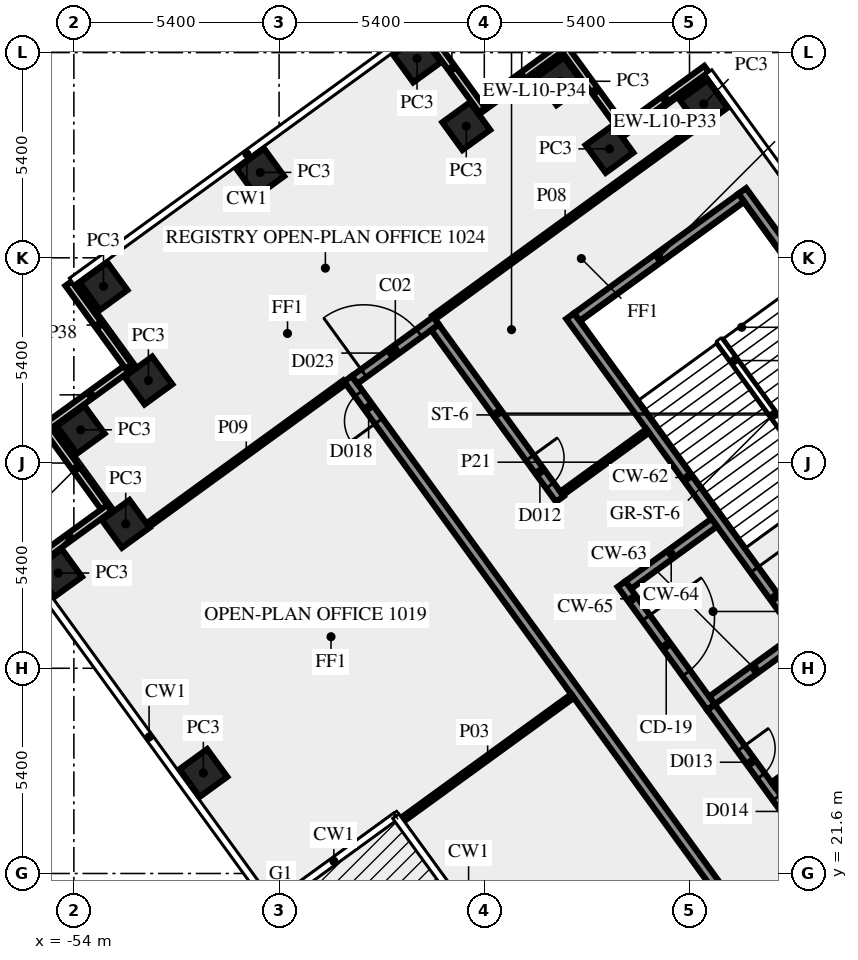
"""IFC4 building model, lengths in metres.
Left out: names, types, materials, properties, quantities, classifications, styles, units other than length and angle.
Written with IfcOpenShell. Run it as: python <this file> out.ifc"""

import sys

from ifc_helpers import new_model, si_unit, direction, frame, frame_2d, origin, origin_2d, place, context, subcontext, project, spatial, rectangle, extrude, element, fill, save


model = new_model("IFC4")
c1 = context("Model", 3, precision=1e-05, world=origin(), true_north=direction((0.0, 1.0)))
c2 = subcontext(c1, "Body", "Model", "MODEL_VIEW")
j1 = project(units=[si_unit("LENGTHUNIT", "METRE"), si_unit("PLANEANGLEUNIT", "RADIAN")], contexts=[c1])
p1 = place(None, origin())
s1 = spatial("IfcSite", under=j1, at=p1, CompositionType="ELEMENT")
p2 = place(p1, origin())
s2 = spatial("IfcBuilding", under=s1, at=p2, CompositionType="ELEMENT")
p3 = place(p2, frame((0.0, 0.0, 47.0)))
s3 = spatial("IfcBuildingStorey", under=s2, at=p3, CompositionType="ELEMENT", Elevation=47.0)
for number, where, z_axis, x_axis in (
    (1, (-37.425, 41.85, 0.0), (0.0, 0.0, 1.0), (-0.588, 0.809, 0.0)),
    (2, (-39.906, 40.666, 0.0), (0.0, 0.0, 1.0), (-0.588, 0.809, 0.0)),
    (3, (-41.2, 42.445, 0.0), (0.0, 0.0, 1.0), (-0.588, 0.809, 0.0)),
    (4, (-43.675, 41.265, 0.0), (0.0, 0.0, 1.0), (-0.809, -0.588, 0.0)),
    (5, (-44.97, 43.045, 0.0), (0.0, 0.0, 1.0), (-0.809, -0.588, 0.0)),
    (6, (-49.096, 40.047, 0.0), (0.0, 0.0, 1.0), (-0.809, -0.588, 0.0)),
    (7, (-53.22, 37.05, 0.0), (0.0, 0.0, 1.0), (0.588, -0.809, 0.0)),
    (8, (-52.039, 34.571, 0.0), (0.0, 0.0, 1.0), (-0.809, -0.588, 0.0)),
    (9, (-53.82, 33.275, 0.0), (0.0, 0.0, 1.0), (0.588, -0.809, 0.0)),
    (10, (-52.636, 30.8, 0.0), (0.0, 0.0, 1.0), (-0.809, -0.588, 0.0)),
    (11, (-54.415, 29.505, 0.0), (0.0, 0.0, 1.0), (0.588, -0.809, 0.0)),
    (12, (-50.592, 24.243, 0.0), (0.0, 0.0, 1.0), (0.588, -0.809, 0.0)),
):
    element("IfcColumn", number, at=place(p3, frame(where, z_axis=z_axis, x_axis=x_axis)), inside=s3, PredefinedType="COLUMN", context=c2, shape_type="SweptSolid", body=[
        extrude(rectangle(XDim=0.9, YDim=0.9, at=origin_2d()), origin(), (0.0, 0.0, 1.0), 3.65),
    ])
p4 = place(p3, frame((-52.465, 34.987, 0.0), z_axis=(0.0, 0.0, 1.0), x_axis=(-0.809033161865, -0.587762999008, 0.0)))
e13 = element("IfcWall", 13, at=p4, inside=s3, PredefinedType="SOLIDWALL", context=c2, shape_type="SweptSolid", body=[
    extrude(rectangle(XDim=2.7, YDim=0.2, at=frame_2d((1.35, 0.0))), origin(), (0.0, 0.0, 1.0), 3.65),
])
p5 = place(p3, frame((-54.738, 33.351, 0.0), z_axis=(0.0, 0.0, 1.0), x_axis=(0.587779184282, -0.809021403008, 0.0)))
e14 = element("IfcWall", 14, at=p5, inside=s3, PredefinedType="SOLIDWALL", context=c2, shape_type="SweptSolid", body=[
    extrude(rectangle(XDim=2.7, YDim=0.2, at=frame_2d((1.35, 0.0))), origin(), (0.0, 0.0, 1.0), 3.65),
])
p6 = place(p3, frame((-53.063, 31.216, 0.0), z_axis=(0.0, 0.0, 1.0), x_axis=(-0.80902431253, -0.587775179585, 0.0)))
e15 = element("IfcWall", 15, at=p6, inside=s3, PredefinedType="SOLIDWALL", context=c2, shape_type="SweptSolid", body=[
    extrude(rectangle(XDim=2.6, YDim=0.2, at=frame_2d((1.3, 0.0))), origin(), (0.0, 0.0, 1.0), 3.65),
])
p7 = place(p3, frame((-37.353, 42.768, 0.0), z_axis=(0.0, 0.0, 1.0), x_axis=(-0.809033161865, -0.587762999008, 0.0)))
e16 = element("IfcWall", 16, at=p7, inside=s3, PredefinedType="SOLIDWALL", context=c2, shape_type="SweptSolid", body=[
    extrude(rectangle(XDim=2.7, YDim=0.2, at=frame_2d((1.35, 0.0))), origin(), (0.0, 0.0, 1.0), 3.65),
])
p8 = place(p3, frame((-39.488, 41.094, 0.0), z_axis=(0.0, 0.0, 1.0), x_axis=(-0.587806000234, 0.809001919707, 0.0)))
e17 = element("IfcWall", 17, at=p8, inside=s3, PredefinedType="SOLIDWALL", context=c2, shape_type="SweptSolid", body=[
    extrude(rectangle(XDim=2.7, YDim=0.2, at=frame_2d((1.35, 0.0))), origin(), (0.0, 0.0, 1.0), 3.65),
])
for number, where, z_axis, x_axis in (
    (18, (-41.124, 43.366, 0.0), (0.0, 0.0, 1.0), (-0.809, -0.588, 0.0)),
    (19, (-43.259, 41.691, 0.0), (0.0, 0.0, 1.0), (-0.588, 0.809, 0.0)),
    (20, (-54.14, 37.123, 0.0), (0.0, 0.0, 1.0), (0.588, -0.809, 0.0)),
):
    element("IfcWall", number, at=place(p3, frame(where, z_axis=z_axis, x_axis=x_axis)), inside=s3, PredefinedType="SOLIDWALL", context=c2, shape_type="SweptSolid", body=[
        extrude(rectangle(XDim=2.7, YDim=0.2, at=frame_2d((1.35, 0.0))), origin(), (0.0, 0.0, 1.0), 3.65),
    ])
p9 = place(p3, frame((-30.24, 31.064, 0.0), z_axis=(0.0, 0.0, 1.0), x_axis=(-0.587795589702, 0.809009483706, 0.0)))
e21 = element("IfcWall", 21, at=p9, inside=s3, PredefinedType="SHEAR", context=c2, shape_type="SweptSolid", body=[
    extrude(rectangle(XDim=10.5, YDim=0.25, at=frame_2d((5.25, 0.0))), origin(), (0.0, 0.0, 1.0), 3.65),
])
p10 = place(p9, frame((2.15, 0.0, 1.0)))
e22 = element("IfcOpeningElement", 22, at=p10, cuts=e21, PredefinedType="OPENING", context=c2, shape_type="SweptSolid", body=[
    extrude(rectangle(XDim=1.2, YDim=1.2, at=frame_2d((0.6, 0.6))), frame((0.0, 0.135, 0.0), z_axis=(0.0, -1.0, 0.0), x_axis=(1.0, 0.0, 0.0)), (0.0, 0.0, 1.0), 0.27),
])
p11 = place(p3, frame((-36.439, 39.384, 0.0), z_axis=(0.0, 0.0, 1.0), x_axis=(-0.809020161303, -0.587780893365, 0.0)))
e23 = element("IfcWall", 23, at=p11, inside=s3, PredefinedType="SHEAR", context=c2, shape_type="SweptSolid", body=[
    extrude(rectangle(XDim=5.35, YDim=0.25, at=frame_2d((2.675, 0.0))), origin(), (0.0, 0.0, 1.0), 3.65),
])
p12 = place(p3, frame((-40.942, 36.267, 0.0), z_axis=(0.0, 0.0, 1.0), x_axis=(0.587795589702, -0.809009483706, 0.0)))
e24 = element("IfcWall", 24, at=p12, inside=s3, PredefinedType="SHEAR", context=c2, shape_type="SweptSolid", body=[
    extrude(rectangle(XDim=10.5, YDim=0.25, at=frame_2d((5.25, 0.0))), origin(), (0.0, 0.0, 1.0), 3.65),
])
p13 = place(p12, frame((8.25, 0.0, 0.0)))
e25 = element("IfcOpeningElement", 25, at=p13, cuts=e24, PredefinedType="OPENING", context=c2, shape_type="SweptSolid", body=[
    extrude(rectangle(XDim=1.8, YDim=2.1, at=frame_2d((0.9, 1.05))), frame((0.0, 0.135, 0.0), z_axis=(0.0, -1.0, 0.0), x_axis=(1.0, 0.0, 0.0)), (0.0, 0.0, 1.0), 0.27),
])
for number, where, z_axis, x_axis in (
    (26, (-34.945, 27.8, 0.0), (0.0, 0.0, 1.0), (-0.809, -0.588, 0.0)),
    (27, (-37.149, 30.834, 0.0), (0.0, 0.0, 1.0), (-0.809, -0.588, 0.0)),
):
    element("IfcWall", number, at=place(p3, frame(where, z_axis=z_axis, x_axis=x_axis)), inside=s3, PredefinedType="SHEAR", context=c2, shape_type="SweptSolid", body=[
        extrude(rectangle(XDim=2.8, YDim=0.25, at=frame_2d((1.4, 0.0))), origin(), (0.0, 0.0, 1.0), 3.65),
    ])
p14 = place(p3, frame((-39.589, 29.216, 0.0), z_axis=(0.0, 0.0, 1.0), x_axis=(0.587772420479, -0.809026317077, 0.0)))
e28 = element("IfcWall", 28, at=p14, inside=s3, PredefinedType="SHEAR", context=c2, shape_type="SweptSolid", body=[
    extrude(rectangle(XDim=4.0, YDim=0.25, at=frame_2d((2.0, 0.0))), origin(), (0.0, 0.0, 1.0), 3.65),
])
p15 = place(p14, frame((1.1, 0.0, 0.0)))
e29 = element("IfcOpeningElement", 29, at=p15, cuts=e28, PredefinedType="OPENING", context=c2, shape_type="SweptSolid", body=[
    extrude(rectangle(XDim=1.8, YDim=2.1, at=frame_2d((0.9, 1.05))), frame((0.0, 0.135, 0.0), z_axis=(0.0, -1.0, 0.0), x_axis=(1.0, 0.0, 0.0)), (0.0, 0.0, 1.0), 0.27),
])
p16 = place(p3, frame((-20.531, -1.523, 0.0), z_axis=(0.0, 0.0, 1.0), x_axis=(-0.587784593204, 0.809017473231, 0.0)))
e30 = element("IfcWall", 30, at=p16, inside=s3, PredefinedType="SOLIDWALL", context=c2, shape_type="SweptSolid", body=[
    extrude(rectangle(XDim=44.67, YDim=0.25, at=frame_2d((22.335, 0.0))), origin(), (0.0, 0.0, 1.0), 3.65),
])
p17 = place(p16, frame((26.14, 0.0, 0.0)))
e31 = element("IfcOpeningElement", 31, at=p17, cuts=e30, PredefinedType="OPENING", context=c2, shape_type="SweptSolid", body=[
    extrude(rectangle(XDim=1.8, YDim=2.1, at=frame_2d((0.9, 1.05))), frame((0.0, 0.135, 0.0), z_axis=(0.0, -1.0, 0.0), x_axis=(1.0, 0.0, 0.0)), (0.0, 0.0, 1.0), 0.27),
])
p18 = place(p16, frame((43.296, 0.0, 0.0)))
e32 = element("IfcOpeningElement", 32, at=p18, cuts=e30, PredefinedType="OPENING", context=c2, shape_type="SweptSolid", body=[
    extrude(rectangle(XDim=0.9, YDim=2.1, at=frame_2d((0.45, 1.05))), frame((0.0, 0.135, 0.0), z_axis=(0.0, -1.0, 0.0), x_axis=(1.0, 0.0, 0.0)), (0.0, 0.0, 1.0), 0.27),
])
p19 = place(p16, frame((13.216, 0.0, 0.0)))
e33 = element("IfcOpeningElement", 33, at=p19, cuts=e30, PredefinedType="OPENING", context=c2, shape_type="SweptSolid", body=[
    extrude(rectangle(XDim=0.9, YDim=2.1, at=frame_2d((0.45, 1.05))), frame((0.0, 0.135, 0.0), z_axis=(0.0, -1.0, 0.0), x_axis=(1.0, 0.0, 0.0)), (0.0, 0.0, 1.0), 0.27),
])
p20 = place(p16, frame((7.816, 0.0, 0.0)))
e34 = element("IfcOpeningElement", 34, at=p20, cuts=e30, PredefinedType="OPENING", context=c2, shape_type="SweptSolid", body=[
    extrude(rectangle(XDim=0.9, YDim=2.1, at=frame_2d((0.45, 1.05))), frame((0.0, 0.135, 0.0), z_axis=(0.0, -1.0, 0.0), x_axis=(1.0, 0.0, 0.0)), (0.0, 0.0, 1.0), 0.27),
])
p21 = place(p16, frame((0.533, 0.0, 0.0)))
e35 = element("IfcOpeningElement", 35, at=p21, cuts=e30, PredefinedType="OPENING", context=c2, shape_type="SweptSolid", body=[
    extrude(rectangle(XDim=0.9, YDim=2.1, at=frame_2d((0.45, 1.05))), frame((0.0, 0.135, 0.0), z_axis=(0.0, -1.0, 0.0), x_axis=(1.0, 0.0, 0.0)), (0.0, 0.0, 1.0), 0.27),
])
p22 = place(p3, frame((-46.613, 34.588, 0.0), z_axis=(0.0, 0.0, 1.0), x_axis=(0.808994936898, 0.587815610607, 0.0)))
e36 = element("IfcWall", 36, at=p22, inside=s3, PredefinedType="SOLIDWALL", context=c2, shape_type="SweptSolid", body=[
    extrude(rectangle(XDim=2.65, YDim=0.25, at=frame_2d((1.325, 0.0))), origin(), (0.0, 0.0, 1.0), 3.65),
])
p23 = place(p22, frame((0.299, 0.0, 0.0)))
e37 = element("IfcOpeningElement", 37, at=p23, cuts=e36, PredefinedType="OPENING", context=c2, shape_type="SweptSolid", body=[
    extrude(rectangle(XDim=1.8, YDim=2.1, at=frame_2d((0.9, 1.05))), frame((0.0, 0.135, 0.0), z_axis=(0.0, -1.0, 0.0), x_axis=(1.0, 0.0, 0.0)), (0.0, 0.0, 1.0), 0.27),
])
p24 = place(p3, frame((-44.497, 35.971, 0.0), z_axis=(0.0, 0.0, 1.0), x_axis=(0.587742866856, -0.809047787501, 0.0)))
e38 = element("IfcWall", 38, at=p24, inside=s3, PredefinedType="SOLIDWALL", context=c2, shape_type="SweptSolid", body=[
    extrude(rectangle(XDim=5.586, YDim=0.25, at=frame_2d((2.793, 0.0))), origin(), (0.0, 0.0, 1.0), 3.65),
])
p25 = place(p24, frame((4.245, 0.0, 0.0)))
e39 = element("IfcOpeningElement", 39, at=p25, cuts=e38, PredefinedType="OPENING", context=c2, shape_type="SweptSolid", body=[
    extrude(rectangle(XDim=0.9, YDim=2.1, at=frame_2d((0.45, 1.05))), frame((0.0, 0.135, 0.0), z_axis=(0.0, -1.0, 0.0), x_axis=(1.0, 0.0, 0.0)), (0.0, 0.0, 1.0), 0.27),
])
p26 = place(p3, frame((-37.232, 25.972, 0.0), z_axis=(0.0, 0.0, 1.0), x_axis=(0.587786323093, -0.809016216391, 0.0)))
e40 = element("IfcWall", 40, at=p26, inside=s3, PredefinedType="SOLIDWALL", context=c2, shape_type="SweptSolid", body=[
    extrude(rectangle(XDim=33.493, YDim=0.25, at=frame_2d((16.747, 0.0))), origin(), (0.0, 0.0, 1.0), 3.65),
])
p27 = place(p26, frame((2.935, 0.0, 0.0)))
e41 = element("IfcOpeningElement", 41, at=p27, cuts=e40, PredefinedType="OPENING", context=c2, shape_type="SweptSolid", body=[
    extrude(rectangle(XDim=0.9, YDim=2.1, at=frame_2d((0.45, 1.05))), frame((0.0, 0.135, 0.0), z_axis=(0.0, -1.0, 0.0), x_axis=(1.0, 0.0, 0.0)), (0.0, 0.0, 1.0), 0.27),
])
p28 = place(p26, frame((16.435, 0.0, 0.0)))
e42 = element("IfcOpeningElement", 42, at=p28, cuts=e40, PredefinedType="OPENING", context=c2, shape_type="SweptSolid", body=[
    extrude(rectangle(XDim=0.9, YDim=2.1, at=frame_2d((0.45, 1.05))), frame((0.0, 0.135, 0.0), z_axis=(0.0, -1.0, 0.0), x_axis=(1.0, 0.0, 0.0)), (0.0, 0.0, 1.0), 0.27),
])
p29 = place(p26, frame((29.152, 0.0, 0.0)))
e43 = element("IfcOpeningElement", 43, at=p29, cuts=e40, PredefinedType="OPENING", context=c2, shape_type="SweptSolid", body=[
    extrude(rectangle(XDim=0.9, YDim=2.1, at=frame_2d((0.45, 1.05))), frame((0.0, 0.135, 0.0), z_axis=(0.0, -1.0, 0.0), x_axis=(1.0, 0.0, 0.0)), (0.0, 0.0, 1.0), 0.27),
])
p30 = place(p26, frame((14.536, 0.0, 0.0)))
e44 = element("IfcOpeningElement", 44, at=p30, cuts=e40, PredefinedType="OPENING", context=c2, shape_type="SweptSolid", body=[
    extrude(rectangle(XDim=1.2, YDim=2.1, at=frame_2d((0.6, 1.05))), frame((0.0, 0.135, 0.0), z_axis=(0.0, -1.0, 0.0), x_axis=(1.0, 0.0, 0.0)), (0.0, 0.0, 1.0), 0.27),
])
p31 = place(p26, frame((1.335, 0.0, 0.0)))
e45 = element("IfcOpeningElement", 45, at=p31, cuts=e40, PredefinedType="OPENING", context=c2, shape_type="SweptSolid", body=[
    extrude(rectangle(XDim=0.9, YDim=2.1, at=frame_2d((0.45, 1.05))), frame((0.0, 0.135, 0.0), z_axis=(0.0, -1.0, 0.0), x_axis=(1.0, 0.0, 0.0)), (0.0, 0.0, 1.0), 0.27),
])
p32 = place(p3, frame((-40.878, 26.27, 0.0), z_axis=(0.0, 0.0, 1.0), x_axis=(-0.809101125304, -0.587669438572, 0.0)))
e46 = element("IfcWall", 46, at=p32, inside=s3, PredefinedType="PARTITIONING", context=c2, shape_type="SweptSolid", body=[
    extrude(rectangle(XDim=5.521, YDim=0.12, at=frame_2d((2.761, 0.0))), origin(), (0.0, 0.0, 1.0), 3.65),
])
p33 = place(p3, frame((-37.614, 41.257, 0.0), z_axis=(0.0, 0.0, 1.0), x_axis=(-0.808991595707, -0.587820208972, 0.0)))
e47 = element("IfcWall", 47, at=p33, inside=s3, PredefinedType="PARTITIONING", context=c2, shape_type="SweptSolid", body=[
    extrude(rectangle(XDim=8.551, YDim=0.12, at=frame_2d((4.275, 0.0))), origin(), (0.0, 0.0, 1.0), 3.65),
])
p34 = place(p3, frame((-46.877, 34.526, 0.0), z_axis=(0.0, 0.0, 1.0), x_axis=(-0.808993566199, -0.587817497059, 0.0)))
e48 = element("IfcWall", 48, at=p34, inside=s3, PredefinedType="PARTITIONING", context=c2, shape_type="SweptSolid", body=[
    extrude(rectangle(XDim=6.395, YDim=0.12, at=frame_2d((3.197, 0.0))), origin(), (0.0, 0.0, 1.0), 3.65),
])
p35 = place(p3, frame((-27.873, 29.551, 0.0), z_axis=(0.0, 0.0, 1.0), x_axis=(-0.809043311713, -0.587749027879, 0.0)))
e49 = element("IfcWall", 49, at=p35, inside=s3, PredefinedType="PARTITIONING", context=c2, shape_type="SweptSolid", body=[
    extrude(rectangle(XDim=9.55, YDim=0.15, at=frame_2d((4.775, 0.0))), origin(), (0.0, 0.0, 1.0), 2.75),
])
p36 = place(p3, frame((-41.166, 31.599, 0.0), z_axis=(0.0, 0.0, 1.0), x_axis=(0.809090262332, 0.587684394381, 0.0)))
e50 = element("IfcWall", 50, at=p36, inside=s3, PredefinedType="PARTITIONING", context=c2, shape_type="SweptSolid", body=[
    extrude(rectangle(XDim=2.801, YDim=0.12, at=frame_2d((1.4, 0.0))), origin(), (0.0, 0.0, 1.0), 3.65),
])
p37 = place(p13, origin())
e51 = element("IfcDoor", 51, at=p37, inside=s3, OperationType="DOUBLE_DOOR_SINGLE_SWING", PredefinedType="DOOR", context=c2, shape_type="SweptSolid", body=[
    extrude(rectangle(XDim=1.8, YDim=2.1, at=frame_2d((0.9, 1.05))), frame((0.0, 0.025, 0.0), z_axis=(0.0, -1.0, 0.0), x_axis=(1.0, 0.0, 0.0)), (0.0, 0.0, 1.0), 0.05),
])
fill(e25, e51)
p38 = place(p15, origin())
e52 = element("IfcDoor", 52, at=p38, inside=s3, OperationType="DOUBLE_DOOR_SINGLE_SWING", PredefinedType="DOOR", context=c2, shape_type="SweptSolid", body=[
    extrude(rectangle(XDim=1.8, YDim=2.1, at=frame_2d((0.9, 1.05))), frame((0.0, 0.025, 0.0), z_axis=(0.0, -1.0, 0.0), x_axis=(1.0, 0.0, 0.0)), (0.0, 0.0, 1.0), 0.05),
])
fill(e29, e52)
p39 = place(p25, origin())
e53 = element("IfcDoor", 53, at=p39, inside=s3, OperationType="SINGLE_SWING_RIGHT", PredefinedType="DOOR", context=c2, shape_type="SweptSolid", body=[
    extrude(rectangle(XDim=0.9, YDim=2.1, at=frame_2d((0.45, 1.05))), frame((0.0, 0.025, 0.0), z_axis=(0.0, -1.0, 0.0), x_axis=(1.0, 0.0, 0.0)), (0.0, 0.0, 1.0), 0.05),
])
fill(e39, e53)
p40 = place(p18, origin())
e54 = element("IfcDoor", 54, at=p40, inside=s3, OperationType="SINGLE_SWING_RIGHT", PredefinedType="DOOR", context=c2, shape_type="SweptSolid", body=[
    extrude(rectangle(XDim=0.9, YDim=2.1, at=frame_2d((0.45, 1.05))), frame((0.0, 0.025, 0.0), z_axis=(0.0, -1.0, 0.0), x_axis=(1.0, 0.0, 0.0)), (0.0, 0.0, 1.0), 0.05),
])
fill(e32, e54)
p41 = place(p27, origin())
e55 = element("IfcDoor", 55, at=p41, inside=s3, OperationType="SINGLE_SWING_LEFT", PredefinedType="DOOR", context=c2, shape_type="SweptSolid", body=[
    extrude(rectangle(XDim=0.9, YDim=2.1, at=frame_2d((0.45, 1.05))), frame((0.0, 0.025, 0.0), z_axis=(0.0, -1.0, 0.0), x_axis=(1.0, 0.0, 0.0)), (0.0, 0.0, 1.0), 0.05),
])
fill(e41, e55)
p42 = place(p23, origin())
e56 = element("IfcDoor", 56, at=p42, inside=s3, OperationType="DOUBLE_DOOR_SINGLE_SWING", PredefinedType="DOOR", context=c2, shape_type="SweptSolid", body=[
    extrude(rectangle(XDim=1.8, YDim=2.1, at=frame_2d((0.9, 1.05))), frame((0.0, 0.025, 0.0), z_axis=(0.0, -1.0, 0.0), x_axis=(1.0, 0.0, 0.0)), (0.0, 0.0, 1.0), 0.05),
])
fill(e37, e56)
p43 = place(p31, origin())
e57 = element("IfcDoor", 57, at=p43, inside=s3, OperationType="SINGLE_SWING_RIGHT", PredefinedType="DOOR", context=c2, shape_type="SweptSolid", body=[
    extrude(rectangle(XDim=0.9, YDim=2.1, at=frame_2d((0.45, 1.05))), frame((0.0, 0.025, 0.0), z_axis=(0.0, -1.0, 0.0), x_axis=(1.0, 0.0, 0.0)), (0.0, 0.0, 1.0), 0.05),
])
fill(e45, e57)
save(model, sys.argv[1])
